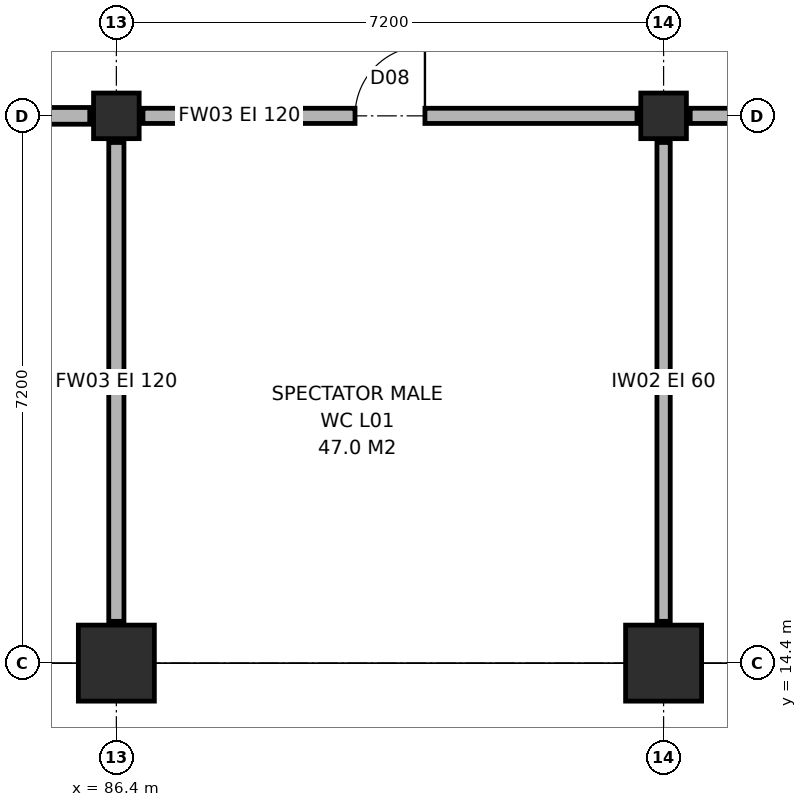
"""IFC4 building model, lengths in metres.
Left out: names, types, materials, properties, quantities, classifications, styles, units other than length and angle.
Written with IfcOpenShell. Run it as: python <this file> out.ifc"""

import sys

from ifc_helpers import new_model, si_unit, direction, frame, frame_2d, origin, origin_2d, place, context, subcontext, project, spatial, rectangle, extrude, element, fill, save


model = new_model("IFC4")
c1 = context("Model", 3, precision=1e-05, world=origin(), true_north=direction((0.0, 1.0)))
c2 = subcontext(c1, "Body", "Model", "MODEL_VIEW")
j1 = project(units=[si_unit("LENGTHUNIT", "METRE"), si_unit("PLANEANGLEUNIT", "RADIAN")], contexts=[c1])
p1 = place(None, origin())
s1 = spatial("IfcSite", under=j1, at=p1, CompositionType="ELEMENT")
p2 = place(p1, origin())
s2 = spatial("IfcBuilding", under=s1, at=p2, CompositionType="ELEMENT")
p3 = place(p2, frame((0.0, 0.0, 5.4)))
s3 = spatial("IfcBuildingStorey", under=s2, at=p3, CompositionType="ELEMENT", Elevation=5.4)
p4 = place(p3, frame((86.4, 14.4, 0.0), z_axis=(0.0, 0.0, 1.0), x_axis=(1.0, 0.0, 0.0)))
e1 = element("IfcColumn", 1, at=p4, inside=s3, PredefinedType="COLUMN", context=c2, shape_type="SweptSolid", body=[
    extrude(rectangle(XDim=1.0, YDim=1.0, at=origin_2d()), origin(), (0.0, 0.0, 1.0), 4.8),
])
p5 = place(p3, frame((86.4, 21.6, 0.0), z_axis=(0.0, 0.0, 1.0), x_axis=(1.0, 0.0, 0.0)))
e2 = element("IfcColumn", 2, at=p5, inside=s3, PredefinedType="COLUMN", context=c2, shape_type="SweptSolid", body=[
    extrude(rectangle(XDim=0.6, YDim=0.6, at=origin_2d()), origin(), (0.0, 0.0, 1.0), 4.8),
])
p6 = place(p3, frame((93.6, 14.4, 0.0), z_axis=(0.0, 0.0, 1.0), x_axis=(1.0, 0.0, 0.0)))
e3 = element("IfcColumn", 3, at=p6, inside=s3, PredefinedType="COLUMN", context=c2, shape_type="SweptSolid", body=[
    extrude(rectangle(XDim=1.0, YDim=1.0, at=origin_2d()), origin(), (0.0, 0.0, 1.0), 4.8),
])
p7 = place(p3, frame((93.6, 21.6, 0.0), z_axis=(0.0, 0.0, 1.0), x_axis=(1.0, 0.0, 0.0)))
e4 = element("IfcColumn", 4, at=p7, inside=s3, PredefinedType="COLUMN", context=c2, shape_type="SweptSolid", body=[
    extrude(rectangle(XDim=0.6, YDim=0.6, at=origin_2d()), origin(), (0.0, 0.0, 1.0), 4.8),
])
p8 = place(p3, frame((79.55, 21.6, 0.0), z_axis=(0.0, 0.0, 1.0), x_axis=(1.0, 0.0, 0.0)))
e5 = element("IfcWall", 5, at=p8, inside=s3, PredefinedType="SOLIDWALL", context=c2, shape_type="SweptSolid", body=[
    extrude(rectangle(XDim=6.5, YDim=0.22, at=frame_2d((3.25, 0.0))), origin(), (0.0, 0.0, 1.0), 4.19),
])
p9 = place(p3, frame((86.4, 14.95, 0.0), z_axis=(0.0, 0.0, 1.0), x_axis=(0.0, 1.0, 0.0)))
e6 = element("IfcWall", 6, at=p9, inside=s3, PredefinedType="SOLIDWALL", context=c2, shape_type="SweptSolid", body=[
    extrude(rectangle(XDim=6.3, YDim=0.2, at=frame_2d((3.15, 0.0))), origin(), (0.0, 0.0, 1.0), 4.15),
])
p10 = place(p3, frame((86.75, 21.6, 0.0), z_axis=(0.0, 0.0, 1.0), x_axis=(1.0, 0.0, 0.0)))
e7 = element("IfcWall", 7, at=p10, inside=s3, PredefinedType="SOLIDWALL", context=c2, shape_type="SweptSolid", body=[
    extrude(rectangle(XDim=6.5, YDim=0.2, at=frame_2d((3.25, 0.0))), origin(), (0.0, 0.0, 1.0), 3.952),
])
p11 = place(p10, frame((2.79, 0.0, 0.0)))
e8 = element("IfcOpeningElement", 8, at=p11, cuts=e7, PredefinedType="OPENING", context=c2, shape_type="SweptSolid", body=[
    extrude(rectangle(XDim=0.92, YDim=2.1, at=frame_2d((0.46, 1.05))), frame((0.0, 0.115, 0.0), z_axis=(0.0, -1.0, 0.0), x_axis=(1.0, 0.0, 0.0)), (0.0, 0.0, 1.0), 0.23),
])
p12 = place(p3, frame((93.6, 14.95, 0.0), z_axis=(0.0, 0.0, 1.0), x_axis=(0.0, 1.0, 0.0)))
e9 = element("IfcWall", 9, at=p12, inside=s3, PredefinedType="PARTITIONING", context=c2, shape_type="SweptSolid", body=[
    extrude(rectangle(XDim=6.3, YDim=0.175, at=frame_2d((3.15, 0.0))), origin(), (0.0, 0.0, 1.0), 4.052),
])
p13 = place(p3, frame((93.95, 21.6, 0.0), z_axis=(0.0, 0.0, 1.0), x_axis=(1.0, 0.0, 0.0)))
e10 = element("IfcWall", 10, at=p13, inside=s3, PredefinedType="SOLIDWALL", context=c2, shape_type="SweptSolid", body=[
    extrude(rectangle(XDim=6.546, YDim=0.2, at=frame_2d((3.273, 0.0))), origin(), (0.0, 0.0, 1.0), 3.952),
])
p14 = place(p13, frame((2.75, 0.0, 0.0)))
e11 = element("IfcOpeningElement", 11, at=p14, cuts=e10, PredefinedType="OPENING", context=c2, shape_type="SweptSolid", body=[
    extrude(rectangle(XDim=1.0, YDim=2.1, at=frame_2d((0.5, 1.05))), frame((0.0, 0.115, 0.0), z_axis=(0.0, -1.0, 0.0), x_axis=(1.0, 0.0, 0.0)), (0.0, 0.0, 1.0), 0.23),
])
p15 = place(p11, frame((0.92, 0.0, 0.0), z_axis=(0.0, 0.0, 1.0), x_axis=(-1.0, 0.0, 0.0)))
e12 = element("IfcDoor", 12, at=p15, inside=s3, OperationType="SINGLE_SWING_LEFT", PredefinedType="DOOR", context=c2, shape_type="SweptSolid", body=[
    extrude(rectangle(XDim=0.92, YDim=2.1, at=frame_2d((0.46, 1.05))), frame((0.0, 0.025, 0.0), z_axis=(0.0, -1.0, 0.0), x_axis=(1.0, 0.0, 0.0)), (0.0, 0.0, 1.0), 0.05),
])
fill(e8, e12)
save(model, sys.argv[1])
